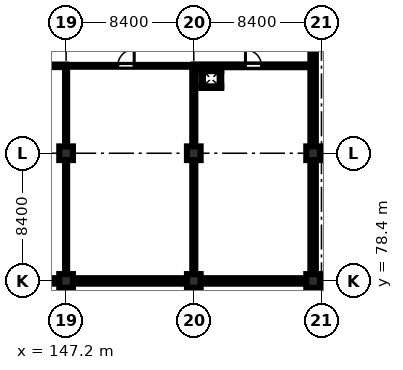
"""IFC4 building model, lengths in metres.
Left out: names, types, materials, properties, quantities, classifications, styles, units other than length and angle.
Written with IfcOpenShell. Run it as: python <this file> out.ifc"""

import sys

from ifc_helpers import new_model, si_unit, direction, frame, frame_2d, origin, origin_2d, place, context, subcontext, project, spatial, rectangle, extrude, element, fill, save


model = new_model("IFC4")
c1 = context("Model", 3, precision=1e-05, world=origin(), true_north=direction((0.0, 1.0)))
c2 = subcontext(c1, "Body", "Model", "MODEL_VIEW")
j1 = project(units=[si_unit("LENGTHUNIT", "METRE"), si_unit("PLANEANGLEUNIT", "RADIAN")], contexts=[c1])
p1 = place(None, origin())
s1 = spatial("IfcSite", under=j1, at=p1, CompositionType="ELEMENT")
p2 = place(p1, origin())
s2 = spatial("IfcBuilding", under=s1, at=p2, CompositionType="ELEMENT")
p3 = place(p2, frame((0.0, 0.0, 19.2)))
s3 = spatial("IfcBuildingStorey", under=s2, at=p3, CompositionType="ELEMENT", Elevation=19.2)
for number, where, z_axis, x_axis in (
    (1, (147.2, 78.4, 0.0), (0.0, 0.0, 1.0), (1.0, 0.0, 0.0)),
    (2, (147.2, 86.8, 0.0), (0.0, 0.0, 1.0), (1.0, 0.0, 0.0)),
    (3, (155.6, 78.4, 0.0), (0.0, 0.0, 1.0), (1.0, 0.0, 0.0)),
    (4, (155.6, 86.8, 0.0), (0.0, 0.0, 1.0), (1.0, 0.0, 0.0)),
    (5, (163.45, 78.4, 0.0), (0.0, 0.0, 1.0), (1.0, 0.0, 0.0)),
    (6, (163.45, 86.8, 0.0), (0.0, 0.0, 1.0), (1.0, 0.0, 0.0)),
):
    element("IfcColumn", number, at=place(p3, frame(where, z_axis=z_axis, x_axis=x_axis)), inside=s3, PredefinedType="COLUMN", context=c2, shape_type="SweptSolid", body=[
        extrude(rectangle(XDim=0.9, YDim=0.9, at=origin_2d()), origin(), (0.0, 0.0, 1.0), 4.02),
    ])
p4 = place(p3, frame((146.75, 78.4, 0.0), z_axis=(0.0, 0.0, 1.0), x_axis=(-1.0, 0.0, 0.0)))
e7 = element("IfcWall", 7, at=p4, inside=s3, PredefinedType="STANDARD", context=c2, shape_type="SweptSolid", body=[
    extrude(rectangle(XDim=7.5, YDim=0.36, at=frame_2d((3.75, 0.0))), origin(), (0.0, 0.0, 1.0), 3.32),
])
p5 = place(p4, frame((1.15, 0.0, 0.95)))
e8 = element("IfcOpeningElement", 8, at=p5, cuts=e7, PredefinedType="OPENING", context=c2, shape_type="SweptSolid", body=[
    extrude(rectangle(XDim=1.5, YDim=1.5, at=frame_2d((0.75, 0.75))), frame((0.0, 0.19, 0.0), z_axis=(0.0, -1.0, 0.0), x_axis=(1.0, 0.0, 0.0)), (0.0, 0.0, 1.0), 0.38),
])
p6 = place(p3, frame((155.15, 78.4, 0.0), z_axis=(0.0, 0.0, 1.0), x_axis=(-1.0, 0.0, 0.0)))
e9 = element("IfcWall", 9, at=p6, inside=s3, PredefinedType="STANDARD", context=c2, shape_type="SweptSolid", body=[
    extrude(rectangle(XDim=7.5, YDim=0.36, at=frame_2d((3.75, 0.0))), origin(), (0.0, 0.0, 1.0), 3.32),
])
p7 = place(p6, frame((1.15, 0.0, 0.95)))
e10 = element("IfcOpeningElement", 10, at=p7, cuts=e9, PredefinedType="OPENING", context=c2, shape_type="SweptSolid", body=[
    extrude(rectangle(XDim=1.5, YDim=1.5, at=frame_2d((0.75, 0.75))), frame((0.0, 0.19, 0.0), z_axis=(0.0, -1.0, 0.0), x_axis=(1.0, 0.0, 0.0)), (0.0, 0.0, 1.0), 0.38),
])
p8 = place(p3, frame((163.0, 78.4, 0.0), z_axis=(0.0, 0.0, 1.0), x_axis=(-1.0, 0.0, 0.0)))
e11 = element("IfcWall", 11, at=p8, inside=s3, PredefinedType="STANDARD", context=c2, shape_type="SweptSolid", body=[
    extrude(rectangle(XDim=6.95, YDim=0.36, at=frame_2d((3.475, 0.0))), origin(), (0.0, 0.0, 1.0), 3.32),
])
p9 = place(p8, frame((1.15, 0.0, 0.95)))
e12 = element("IfcOpeningElement", 12, at=p9, cuts=e11, PredefinedType="OPENING", context=c2, shape_type="SweptSolid", body=[
    extrude(rectangle(XDim=1.5, YDim=1.5, at=frame_2d((0.75, 0.75))), frame((0.0, 0.19, 0.0), z_axis=(0.0, -1.0, 0.0), x_axis=(1.0, 0.0, 0.0)), (0.0, 0.0, 1.0), 0.38),
])
p10 = place(p3, frame((163.45, 86.35, 0.0), z_axis=(0.0, 0.0, 1.0), x_axis=(0.0, -1.0, 0.0)))
e13 = element("IfcWall", 13, at=p10, inside=s3, PredefinedType="STANDARD", context=c2, shape_type="SweptSolid", body=[
    extrude(rectangle(XDim=7.5, YDim=0.36, at=frame_2d((3.75, 0.0))), origin(), (0.0, 0.0, 1.0), 3.32),
])
p11 = place(p10, frame((1.15, 0.0, 1.1)))
e14 = element("IfcOpeningElement", 14, at=p11, cuts=e13, PredefinedType="OPENING", context=c2, shape_type="SweptSolid", body=[
    extrude(rectangle(XDim=1.8, YDim=1.8, at=frame_2d((0.9, 0.9))), frame((0.0, 0.19, 0.0), z_axis=(0.0, -1.0, 0.0), x_axis=(1.0, 0.0, 0.0)), (0.0, 0.0, 1.0), 0.38),
])
p12 = place(p3, frame((163.45, 94.75, 0.0), z_axis=(0.0, 0.0, 1.0), x_axis=(0.0, -1.0, 0.0)))
e15 = element("IfcWall", 15, at=p12, inside=s3, PredefinedType="STANDARD", context=c2, shape_type="SweptSolid", body=[
    extrude(rectangle(XDim=7.5, YDim=0.36, at=frame_2d((3.75, 0.0))), origin(), (0.0, 0.0, 1.0), 3.32),
])
p13 = place(p12, frame((4.2, 0.0, 1.1)))
e16 = element("IfcOpeningElement", 16, at=p13, cuts=e15, PredefinedType="OPENING", context=c2, shape_type="SweptSolid", body=[
    extrude(rectangle(XDim=1.8, YDim=1.8, at=frame_2d((0.9, 0.9))), frame((0.0, 0.19, 0.0), z_axis=(0.0, -1.0, 0.0), x_axis=(1.0, 0.0, 0.0)), (0.0, 0.0, 1.0), 0.38),
])
p14 = place(p3, frame((138.8, 92.55, 0.0), z_axis=(0.0, 0.0, 1.0), x_axis=(1.0, 0.0, 0.0)))
e17 = element("IfcWall", 17, at=p14, inside=s3, PredefinedType="PARTITIONING", context=c2, shape_type="SweptSolid", body=[
    extrude(rectangle(XDim=8.4, YDim=0.165, at=frame_2d((4.2, 0.0))), origin(), (0.0, 0.0, 1.0), 4.02),
])
p15 = place(p14, frame((3.4, 0.0, 0.0)))
e18 = element("IfcOpeningElement", 18, at=p15, cuts=e17, PredefinedType="OPENING", context=c2, shape_type="SweptSolid", body=[
    extrude(rectangle(XDim=1.02, YDim=2.15, at=frame_2d((0.51, 1.075))), frame((0.0, 0.093, 0.0), z_axis=(0.0, -1.0, 0.0), x_axis=(1.0, 0.0, 0.0)), (0.0, 0.0, 1.0), 0.185),
])
p16 = place(p3, frame((147.2, 92.55, 0.0), z_axis=(0.0, 0.0, 1.0), x_axis=(1.0, 0.0, 0.0)))
e19 = element("IfcWall", 19, at=p16, inside=s3, PredefinedType="PARTITIONING", context=c2, shape_type="SweptSolid", body=[
    extrude(rectangle(XDim=8.4, YDim=0.12, at=frame_2d((4.2, 0.0))), origin(), (0.0, 0.0, 1.0), 4.02),
])
p17 = place(p16, frame((3.4, 0.0, 0.0)))
e20 = element("IfcOpeningElement", 20, at=p17, cuts=e19, PredefinedType="OPENING", context=c2, shape_type="SweptSolid", body=[
    extrude(rectangle(XDim=1.08, YDim=2.15, at=frame_2d((0.54, 1.075))), frame((0.0, 0.07, 0.0), z_axis=(0.0, -1.0, 0.0), x_axis=(1.0, 0.0, 0.0)), (0.0, 0.0, 1.0), 0.14),
])
p18 = place(p3, frame((147.2, 78.55, 0.0), z_axis=(0.0, 0.0, 1.0), x_axis=(0.0, 1.0, 0.0)))
e21 = element("IfcWall", 21, at=p18, inside=s3, PredefinedType="PARTITIONING", context=c2, shape_type="SweptSolid", body=[
    extrude(rectangle(XDim=14.0, YDim=0.135, at=frame_2d((7.0, 0.0))), origin(), (0.0, 0.0, 1.0), 3.32),
])
p19 = place(p3, frame((155.6, 92.55, 0.0), z_axis=(0.0, 0.0, 1.0), x_axis=(1.0, 0.0, 0.0)))
e22 = element("IfcWall", 22, at=p19, inside=s3, PredefinedType="STANDARD", context=c2, shape_type="SweptSolid", body=[
    extrude(rectangle(XDim=7.75, YDim=0.18, at=frame_2d((3.875, 0.0))), origin(), (0.0, 0.0, 1.0), 4.02),
])
p20 = place(p19, frame((3.4, 0.0, 0.0)))
e23 = element("IfcOpeningElement", 23, at=p20, cuts=e22, PredefinedType="OPENING", context=c2, shape_type="SweptSolid", body=[
    extrude(rectangle(XDim=1.05, YDim=2.15, at=frame_2d((0.525, 1.075))), frame((0.0, 0.1, 0.0), z_axis=(0.0, -1.0, 0.0), x_axis=(1.0, 0.0, 0.0)), (0.0, 0.0, 1.0), 0.2),
])
p21 = place(p3, frame((155.6, 78.55, 0.0), z_axis=(0.0, 0.0, 1.0), x_axis=(0.0, 1.0, 0.0)))
e24 = element("IfcWall", 24, at=p21, inside=s3, PredefinedType="SOLIDWALL", context=c2, shape_type="SweptSolid", body=[
    extrude(rectangle(XDim=14.0, YDim=0.2, at=frame_2d((7.0, 0.0))), origin(), (0.0, 0.0, 1.0), 3.32),
])
for number, where, z_axis, x_axis in (
    (25, (156.095, 91.147, 0.0), (0.0, 0.0, 1.0), (1.0, 0.0, 0.0)),
    (26, (156.095, 92.252, 0.0), (0.0, 0.0, 1.0), (1.0, 0.0, 0.0)),
):
    element("IfcWall", number, at=place(p3, frame(where, z_axis=z_axis, x_axis=x_axis)), inside=s3, PredefinedType="PARTITIONING", context=c2, shape_type="SweptSolid", body=[
        extrude(rectangle(XDim=1.31, YDim=0.105, at=frame_2d((0.655, 0.0))), origin(), (0.0, 0.0, 1.0), 4.02),
    ])
for number, where, z_axis, x_axis in (
    (27, (156.147, 91.2, 0.0), (0.0, 0.0, 1.0), (0.0, 1.0, 0.0)),
    (28, (157.353, 91.2, 0.0), (0.0, 0.0, 1.0), (0.0, 1.0, 0.0)),
):
    element("IfcWall", number, at=place(p3, frame(where, z_axis=z_axis, x_axis=x_axis)), inside=s3, PredefinedType="PARTITIONING", context=c2, shape_type="SweptSolid", body=[
        extrude(rectangle(XDim=1.0, YDim=0.105, at=frame_2d((0.5, 0.0))), origin(), (0.0, 0.0, 1.0), 4.02),
    ])
p22 = place(p7, origin())
e29 = element("IfcWindow", 29, at=p22, inside=s3, PartitioningType="DOUBLE_PANEL_VERTICAL", PredefinedType="WINDOW", context=c2, shape_type="SweptSolid", body=[
    extrude(rectangle(XDim=1.5, YDim=1.5, at=frame_2d((0.75, 0.75))), frame((0.0, 0.03, 0.0), z_axis=(0.0, -1.0, 0.0), x_axis=(1.0, 0.0, 0.0)), (0.0, 0.0, 1.0), 0.06),
])
fill(e10, e29)
p23 = place(p9, origin())
e30 = element("IfcWindow", 30, at=p23, inside=s3, PartitioningType="DOUBLE_PANEL_VERTICAL", PredefinedType="WINDOW", context=c2, shape_type="SweptSolid", body=[
    extrude(rectangle(XDim=1.5, YDim=1.5, at=frame_2d((0.75, 0.75))), frame((0.0, 0.03, 0.0), z_axis=(0.0, -1.0, 0.0), x_axis=(1.0, 0.0, 0.0)), (0.0, 0.0, 1.0), 0.06),
])
fill(e12, e30)
p24 = place(p11, origin())
e31 = element("IfcWindow", 31, at=p24, inside=s3, PartitioningType="DOUBLE_PANEL_VERTICAL", PredefinedType="WINDOW", context=c2, shape_type="SweptSolid", body=[
    extrude(rectangle(XDim=1.8, YDim=1.8, at=frame_2d((0.9, 0.9))), frame((0.0, 0.03, 0.0), z_axis=(0.0, -1.0, 0.0), x_axis=(1.0, 0.0, 0.0)), (0.0, 0.0, 1.0), 0.06),
])
fill(e14, e31)
p25 = place(p13, origin())
e32 = element("IfcWindow", 32, at=p25, inside=s3, PartitioningType="DOUBLE_PANEL_VERTICAL", PredefinedType="WINDOW", context=c2, shape_type="SweptSolid", body=[
    extrude(rectangle(XDim=1.8, YDim=1.8, at=frame_2d((0.9, 0.9))), frame((0.0, 0.03, 0.0), z_axis=(0.0, -1.0, 0.0), x_axis=(1.0, 0.0, 0.0)), (0.0, 0.0, 1.0), 0.06),
])
fill(e16, e32)
p26 = place(p17, origin())
e33 = element("IfcDoor", 33, at=p26, inside=s3, OperationType="SINGLE_SWING_RIGHT", PredefinedType="DOOR", context=c2, shape_type="SweptSolid", body=[
    extrude(rectangle(XDim=1.08, YDim=2.15, at=frame_2d((0.54, 1.075))), frame((0.0, 0.025, 0.0), z_axis=(0.0, -1.0, 0.0), x_axis=(1.0, 0.0, 0.0)), (0.0, 0.0, 1.0), 0.05),
])
fill(e20, e33)
p27 = place(p20, origin())
e34 = element("IfcDoor", 34, at=p27, inside=s3, OperationType="SINGLE_SWING_LEFT", PredefinedType="DOOR", context=c2, shape_type="SweptSolid", body=[
    extrude(rectangle(XDim=1.05, YDim=2.15, at=frame_2d((0.525, 1.075))), frame((0.0, 0.025, 0.0), z_axis=(0.0, -1.0, 0.0), x_axis=(1.0, 0.0, 0.0)), (0.0, 0.0, 1.0), 0.05),
])
fill(e23, e34)
save(model, sys.argv[1])
